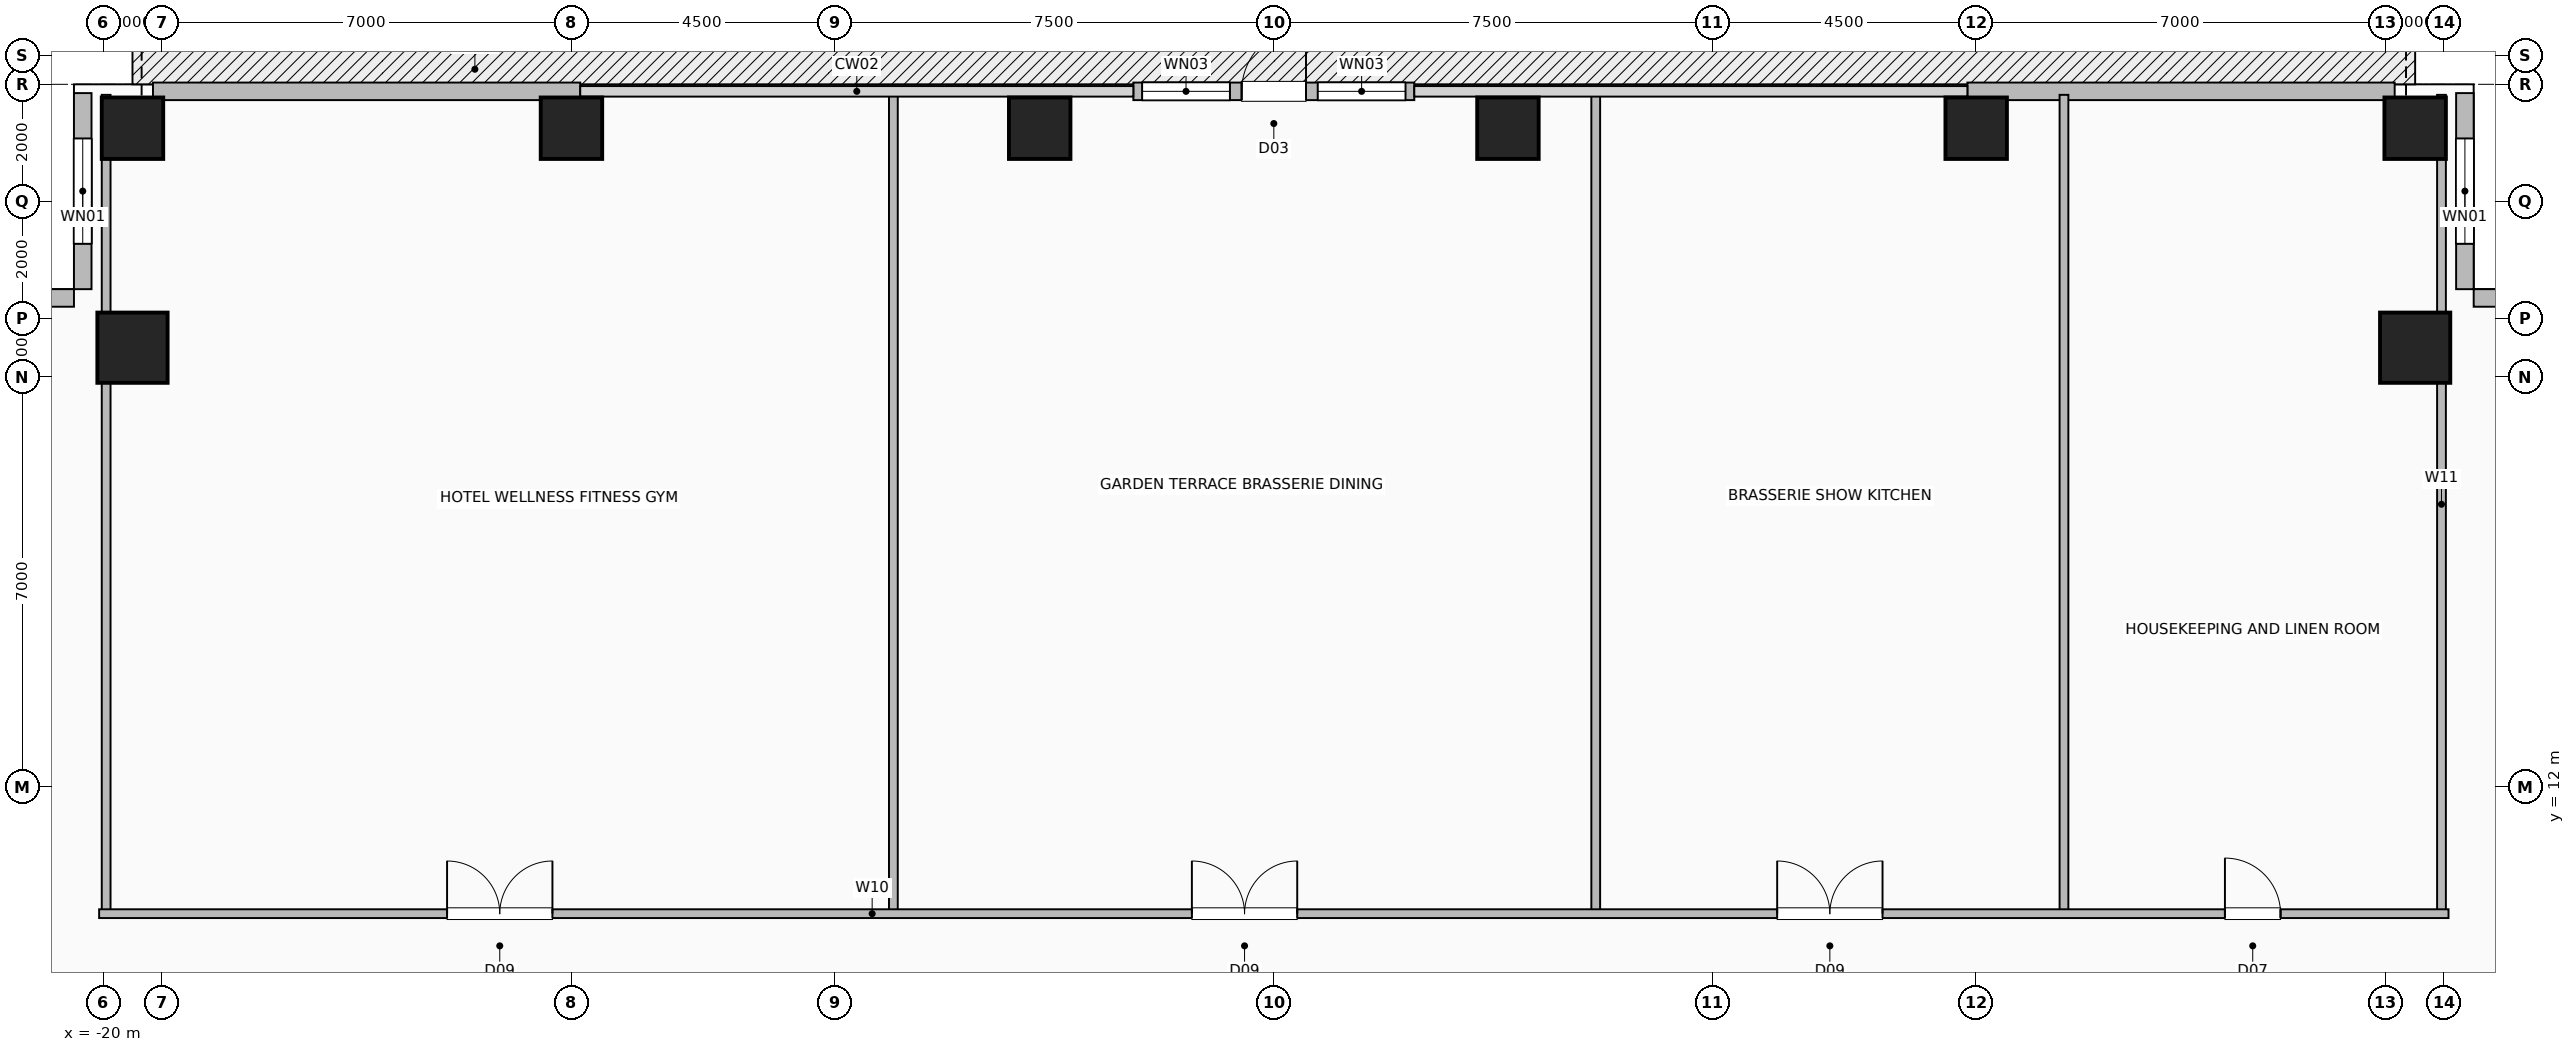
"""IFC4 building model, lengths in metres.
Left out: names, types, materials, properties, quantities, classifications, styles, units other than length and angle.
Written with IfcOpenShell. Run it as: python <this file> out.ifc"""

import sys

from ifc_helpers import new_model, si_unit, direction, frame, frame_2d, origin, origin_2d, place, context, subcontext, project, spatial, rectangle, hollow_rectangle, extrude, element, fill, save


model = new_model("IFC4")
c1 = context("Model", 3, precision=1e-05, world=origin(), true_north=direction((0.0, 1.0)))
c2 = subcontext(c1, "Body", "Model", "MODEL_VIEW")
j1 = project(units=[si_unit("LENGTHUNIT", "METRE"), si_unit("PLANEANGLEUNIT", "RADIAN")], contexts=[c1])
p1 = place(None, origin())
s1 = spatial("IfcSite", under=j1, at=p1, CompositionType="ELEMENT")
p2 = place(p1, origin())
s2 = spatial("IfcBuilding", under=s1, at=p2, CompositionType="ELEMENT")
p3 = place(p2, frame((0.0, 0.0, 55.0)))
s3 = spatial("IfcBuildingStorey", under=s2, at=p3, CompositionType="ELEMENT", Elevation=55.0)
for number, where, z_axis, x_axis in (
    (1, (-19.5, 23.25, 0.0), (0.0, 0.0, 1.0), (1.0, 0.0, 0.0)),
    (2, (-12.0, 23.25, 0.0), (0.0, 0.0, 1.0), (1.0, 0.0, 0.0)),
    (3, (-4.0, 23.25, 0.0), (0.0, 0.0, 1.0), (1.0, 0.0, 0.0)),
    (4, (4.0, 23.25, 0.0), (0.0, 0.0, 1.0), (1.0, 0.0, 0.0)),
    (5, (12.0, 23.25, 0.0), (0.0, 0.0, 1.0), (1.0, 0.0, 0.0)),
    (6, (19.5, 23.25, 0.0), (0.0, 0.0, 1.0), (1.0, 0.0, 0.0)),
):
    element("IfcColumn", number, at=place(p3, frame(where, z_axis=z_axis, x_axis=x_axis)), inside=s3, PredefinedType="COLUMN", context=c2, shape_type="SweptSolid", body=[
        extrude(hollow_rectangle(XDim=1.05, YDim=1.05, WallThickness=0.05, at=origin_2d()), origin(), (0.0, 0.0, 1.0), 3.5),
    ])
for number, where, z_axis, x_axis in (
    (7, (19.5, 19.5, 0.0), (0.0, 0.0, 1.0), (1.0, 0.0, 0.0)),
    (8, (-19.5, 19.5, 0.0), (0.0, 0.0, 1.0), (1.0, 0.0, 0.0)),
):
    element("IfcColumn", number, at=place(p3, frame(where, z_axis=z_axis, x_axis=x_axis)), inside=s3, PredefinedType="COLUMN", context=c2, shape_type="SweptSolid", body=[
        extrude(hollow_rectangle(XDim=1.2, YDim=1.2, WallThickness=0.055, at=origin_2d()), origin(), (0.0, 0.0, 1.0), 3.5),
    ])
for number, where, z_axis, x_axis in (
    (9, (-19.15, 23.88, 0.0), (0.0, 0.0, 1.0), (1.0, 0.0, 0.0)),
    (10, (11.85, 23.88, 0.0), (0.0, 0.0, 1.0), (1.0, 0.0, 0.0)),
):
    element("IfcWall", number, at=place(p3, frame(where, z_axis=z_axis, x_axis=x_axis)), inside=s3, PredefinedType="SOLIDWALL", context=c2, shape_type="SweptSolid", body=[
        extrude(rectangle(XDim=7.3, YDim=0.3, at=frame_2d((3.65, 0.0))), origin(), (0.0, 0.0, 1.0), 3.25),
    ])
p4 = place(p3, frame((-2.4, 23.88, 0.0), z_axis=(0.0, 0.0, 1.0), x_axis=(1.0, 0.0, 0.0)))
e11 = element("IfcWall", 11, at=p4, inside=s3, PredefinedType="SOLIDWALL", context=c2, shape_type="SweptSolid", body=[
    extrude(rectangle(XDim=4.8, YDim=0.3, at=frame_2d((2.4, 0.0))), origin(), (0.0, 0.0, 1.0), 3.25),
])
p5 = place(p4, frame((1.85, 0.0, 0.0)))
e12 = element("IfcOpeningElement", 12, at=p5, cuts=e11, PredefinedType="OPENING", context=c2, shape_type="SweptSolid", body=[
    extrude(rectangle(XDim=1.1, YDim=2.2, at=frame_2d((0.55, 1.1))), frame((0.0, 0.16, 0.0), z_axis=(0.0, -1.0, 0.0), x_axis=(1.0, 0.0, 0.0)), (0.0, 0.0, 1.0), 0.32),
])
p6 = place(p4, frame((0.15, 0.0, 0.85)))
e13 = element("IfcOpeningElement", 13, at=p6, cuts=e11, PredefinedType="OPENING", context=c2, shape_type="SweptSolid", body=[
    extrude(rectangle(XDim=1.5, YDim=1.8, at=frame_2d((0.75, 0.9))), frame((0.0, 0.16, 0.0), z_axis=(0.0, -1.0, 0.0), x_axis=(1.0, 0.0, 0.0)), (0.0, 0.0, 1.0), 0.32),
])
p7 = place(p4, frame((3.15, 0.0, 0.85)))
e14 = element("IfcOpeningElement", 14, at=p7, cuts=e11, PredefinedType="OPENING", context=c2, shape_type="SweptSolid", body=[
    extrude(rectangle(XDim=1.5, YDim=1.8, at=frame_2d((0.75, 0.9))), frame((0.0, 0.16, 0.0), z_axis=(0.0, -1.0, 0.0), x_axis=(1.0, 0.0, 0.0)), (0.0, 0.0, 1.0), 0.32),
])
p8 = place(p3, frame((20.35, 23.85, 0.0), z_axis=(0.0, 0.0, 1.0), x_axis=(0.0, -1.0, 0.0)))
e15 = element("IfcWall", 15, at=p8, inside=s3, PredefinedType="SOLIDWALL", context=c2, shape_type="SweptSolid", body=[
    extrude(rectangle(XDim=3.35, YDim=0.3, at=frame_2d((1.675, 0.0))), origin(), (0.0, 0.0, 1.0), 3.25),
])
p9 = place(p8, frame((0.775, 0.0, 0.9)))
e16 = element("IfcOpeningElement", 16, at=p9, cuts=e15, PredefinedType="OPENING", context=c2, shape_type="SweptSolid", body=[
    extrude(rectangle(XDim=1.8, YDim=1.8, at=frame_2d((0.9, 0.9))), frame((0.0, 0.16, 0.0), z_axis=(0.0, -1.0, 0.0), x_axis=(1.0, 0.0, 0.0)), (0.0, 0.0, 1.0), 0.32),
])
p10 = place(p3, frame((23.85, 20.35, 0.0), z_axis=(0.0, 0.0, 1.0), x_axis=(-1.0, 0.0, 0.0)))
e17 = element("IfcWall", 17, at=p10, inside=s3, PredefinedType="SOLIDWALL", context=c2, shape_type="SweptSolid", body=[
    extrude(rectangle(XDim=3.35, YDim=0.3, at=frame_2d((1.675, 0.0))), origin(), (0.0, 0.0, 1.0), 3.25),
])
p11 = place(p3, frame((-20.35, 23.85, 0.0), z_axis=(0.0, 0.0, 1.0), x_axis=(0.0, -1.0, 0.0)))
e18 = element("IfcWall", 18, at=p11, inside=s3, PredefinedType="SOLIDWALL", context=c2, shape_type="SweptSolid", body=[
    extrude(rectangle(XDim=3.35, YDim=0.3, at=frame_2d((1.675, 0.0))), origin(), (0.0, 0.0, 1.0), 3.25),
])
p12 = place(p11, frame((0.775, 0.0, 0.9)))
e19 = element("IfcOpeningElement", 19, at=p12, cuts=e18, PredefinedType="OPENING", context=c2, shape_type="SweptSolid", body=[
    extrude(rectangle(XDim=1.8, YDim=1.8, at=frame_2d((0.9, 0.9))), frame((0.0, 0.16, 0.0), z_axis=(0.0, -1.0, 0.0), x_axis=(1.0, 0.0, 0.0)), (0.0, 0.0, 1.0), 0.32),
])
p13 = place(p3, frame((-23.85, 20.35, 0.0), z_axis=(0.0, 0.0, 1.0), x_axis=(1.0, 0.0, 0.0)))
e20 = element("IfcWall", 20, at=p13, inside=s3, PredefinedType="SOLIDWALL", context=c2, shape_type="SweptSolid", body=[
    extrude(rectangle(XDim=3.35, YDim=0.3, at=frame_2d((1.675, 0.0))), origin(), (0.0, 0.0, 1.0), 3.25),
])
for number, where, z_axis, x_axis in (
    (21, (-19.95, 9.83, 0.0), (0.0, 0.0, 1.0), (0.0, 1.0, 0.0)),
    (22, (-6.5, 9.83, 0.0), (0.0, 0.0, 1.0), (0.0, 1.0, 0.0)),
    (23, (5.5, 9.83, 0.0), (0.0, 0.0, 1.0), (0.0, 1.0, 0.0)),
    (24, (13.5, 9.83, 0.0), (0.0, 0.0, 1.0), (0.0, 1.0, 0.0)),
    (25, (19.95, 9.83, 0.0), (0.0, 0.0, 1.0), (0.0, 1.0, 0.0)),
):
    element("IfcWall", number, at=place(p3, frame(where, z_axis=z_axis, x_axis=x_axis)), inside=s3, PredefinedType="PARTITIONING", context=c2, shape_type="SweptSolid", body=[
        extrude(rectangle(XDim=13.99, YDim=0.15, at=frame_2d((6.995, 0.0))), origin(), (0.0, 0.0, 1.0), 3.25),
    ])
p14 = place(p3, frame((-20.07, 9.83, 0.0), z_axis=(0.0, 0.0, 1.0), x_axis=(1.0, 0.0, 0.0)))
e26 = element("IfcWall", 26, at=p14, inside=s3, PredefinedType="PARTITIONING", context=c2, shape_type="SweptSolid", body=[
    extrude(rectangle(XDim=40.14, YDim=0.15, at=frame_2d((20.07, 0.0))), origin(), (0.0, 0.0, 1.0), 3.25),
])
p15 = place(p14, frame((5.945, 0.0, 0.0)))
e27 = element("IfcOpeningElement", 27, at=p15, cuts=e26, PredefinedType="OPENING", context=c2, shape_type="SweptSolid", body=[
    extrude(rectangle(XDim=1.8, YDim=2.08, at=frame_2d((0.9, 1.04))), frame((0.0, 0.085, 0.0), z_axis=(0.0, -1.0, 0.0), x_axis=(1.0, 0.0, 0.0)), (0.0, 0.0, 1.0), 0.17),
])
p16 = place(p14, frame((18.67, 0.0, 0.0)))
e28 = element("IfcOpeningElement", 28, at=p16, cuts=e26, PredefinedType="OPENING", context=c2, shape_type="SweptSolid", body=[
    extrude(rectangle(XDim=1.8, YDim=2.08, at=frame_2d((0.9, 1.04))), frame((0.0, 0.085, 0.0), z_axis=(0.0, -1.0, 0.0), x_axis=(1.0, 0.0, 0.0)), (0.0, 0.0, 1.0), 0.17),
])
p17 = place(p14, frame((28.67, 0.0, 0.0)))
e29 = element("IfcOpeningElement", 29, at=p17, cuts=e26, PredefinedType="OPENING", context=c2, shape_type="SweptSolid", body=[
    extrude(rectangle(XDim=1.8, YDim=2.08, at=frame_2d((0.9, 1.04))), frame((0.0, 0.085, 0.0), z_axis=(0.0, -1.0, 0.0), x_axis=(1.0, 0.0, 0.0)), (0.0, 0.0, 1.0), 0.17),
])
p18 = place(p14, frame((36.32, 0.0, 0.0)))
e30 = element("IfcOpeningElement", 30, at=p18, cuts=e26, PredefinedType="OPENING", context=c2, shape_type="SweptSolid", body=[
    extrude(rectangle(XDim=0.95, YDim=2.06, at=frame_2d((0.475, 1.03))), frame((0.0, 0.085, 0.0), z_axis=(0.0, -1.0, 0.0), x_axis=(1.0, 0.0, 0.0)), (0.0, 0.0, 1.0), 0.17),
])
p19 = place(p5, origin())
e31 = element("IfcDoor", 31, at=p19, inside=s3, OperationType="SINGLE_SWING_RIGHT", PredefinedType="DOOR", context=c2, shape_type="SweptSolid", body=[
    extrude(rectangle(XDim=1.1, YDim=2.2, at=frame_2d((0.55, 1.1))), frame((0.0, 0.025, 0.0), z_axis=(0.0, -1.0, 0.0), x_axis=(1.0, 0.0, 0.0)), (0.0, 0.0, 1.0), 0.05),
])
fill(e12, e31)
p20 = place(p6, origin())
e32 = element("IfcWindow", 32, at=p20, inside=s3, PartitioningType="SINGLE_PANEL", PredefinedType="WINDOW", context=c2, shape_type="SweptSolid", body=[
    extrude(rectangle(XDim=1.5, YDim=1.8, at=frame_2d((0.75, 0.9))), frame((0.0, 0.03, 0.0), z_axis=(0.0, -1.0, 0.0), x_axis=(1.0, 0.0, 0.0)), (0.0, 0.0, 1.0), 0.06),
])
fill(e13, e32)
p21 = place(p7, origin())
e33 = element("IfcWindow", 33, at=p21, inside=s3, PartitioningType="SINGLE_PANEL", PredefinedType="WINDOW", context=c2, shape_type="SweptSolid", body=[
    extrude(rectangle(XDim=1.5, YDim=1.8, at=frame_2d((0.75, 0.9))), frame((0.0, 0.03, 0.0), z_axis=(0.0, -1.0, 0.0), x_axis=(1.0, 0.0, 0.0)), (0.0, 0.0, 1.0), 0.06),
])
fill(e14, e33)
p22 = place(p9, origin())
e34 = element("IfcWindow", 34, at=p22, inside=s3, PartitioningType="SINGLE_PANEL", PredefinedType="WINDOW", context=c2, shape_type="SweptSolid", body=[
    extrude(rectangle(XDim=1.8, YDim=1.8, at=frame_2d((0.9, 0.9))), frame((0.0, 0.03, 0.0), z_axis=(0.0, -1.0, 0.0), x_axis=(1.0, 0.0, 0.0)), (0.0, 0.0, 1.0), 0.06),
])
fill(e16, e34)
p23 = place(p12, origin())
e35 = element("IfcWindow", 35, at=p23, inside=s3, PartitioningType="SINGLE_PANEL", PredefinedType="WINDOW", context=c2, shape_type="SweptSolid", body=[
    extrude(rectangle(XDim=1.8, YDim=1.8, at=frame_2d((0.9, 0.9))), frame((0.0, 0.03, 0.0), z_axis=(0.0, -1.0, 0.0), x_axis=(1.0, 0.0, 0.0)), (0.0, 0.0, 1.0), 0.06),
])
fill(e19, e35)
p24 = place(p15, origin())
e36 = element("IfcDoor", 36, at=p24, inside=s3, OperationType="DOUBLE_DOOR_SINGLE_SWING", PredefinedType="DOOR", context=c2, shape_type="SweptSolid", body=[
    extrude(rectangle(XDim=1.8, YDim=2.08, at=frame_2d((0.9, 1.04))), frame((0.0, 0.025, 0.0), z_axis=(0.0, -1.0, 0.0), x_axis=(1.0, 0.0, 0.0)), (0.0, 0.0, 1.0), 0.05),
])
fill(e27, e36)
p25 = place(p16, origin())
e37 = element("IfcDoor", 37, at=p25, inside=s3, OperationType="DOUBLE_DOOR_SINGLE_SWING", PredefinedType="DOOR", context=c2, shape_type="SweptSolid", body=[
    extrude(rectangle(XDim=1.8, YDim=2.08, at=frame_2d((0.9, 1.04))), frame((0.0, 0.025, 0.0), z_axis=(0.0, -1.0, 0.0), x_axis=(1.0, 0.0, 0.0)), (0.0, 0.0, 1.0), 0.05),
])
fill(e28, e37)
p26 = place(p17, origin())
e38 = element("IfcDoor", 38, at=p26, inside=s3, OperationType="DOUBLE_DOOR_SINGLE_SWING", PredefinedType="DOOR", context=c2, shape_type="SweptSolid", body=[
    extrude(rectangle(XDim=1.8, YDim=2.08, at=frame_2d((0.9, 1.04))), frame((0.0, 0.025, 0.0), z_axis=(0.0, -1.0, 0.0), x_axis=(1.0, 0.0, 0.0)), (0.0, 0.0, 1.0), 0.05),
])
fill(e29, e38)
p27 = place(p18, origin())
e39 = element("IfcDoor", 39, at=p27, inside=s3, OperationType="SINGLE_SWING_LEFT", PredefinedType="DOOR", context=c2, shape_type="SweptSolid", body=[
    extrude(rectangle(XDim=0.95, YDim=2.06, at=frame_2d((0.475, 1.03))), frame((0.0, 0.025, 0.0), z_axis=(0.0, -1.0, 0.0), x_axis=(1.0, 0.0, 0.0)), (0.0, 0.0, 1.0), 0.05),
])
fill(e30, e39)
save(model, sys.argv[1])
